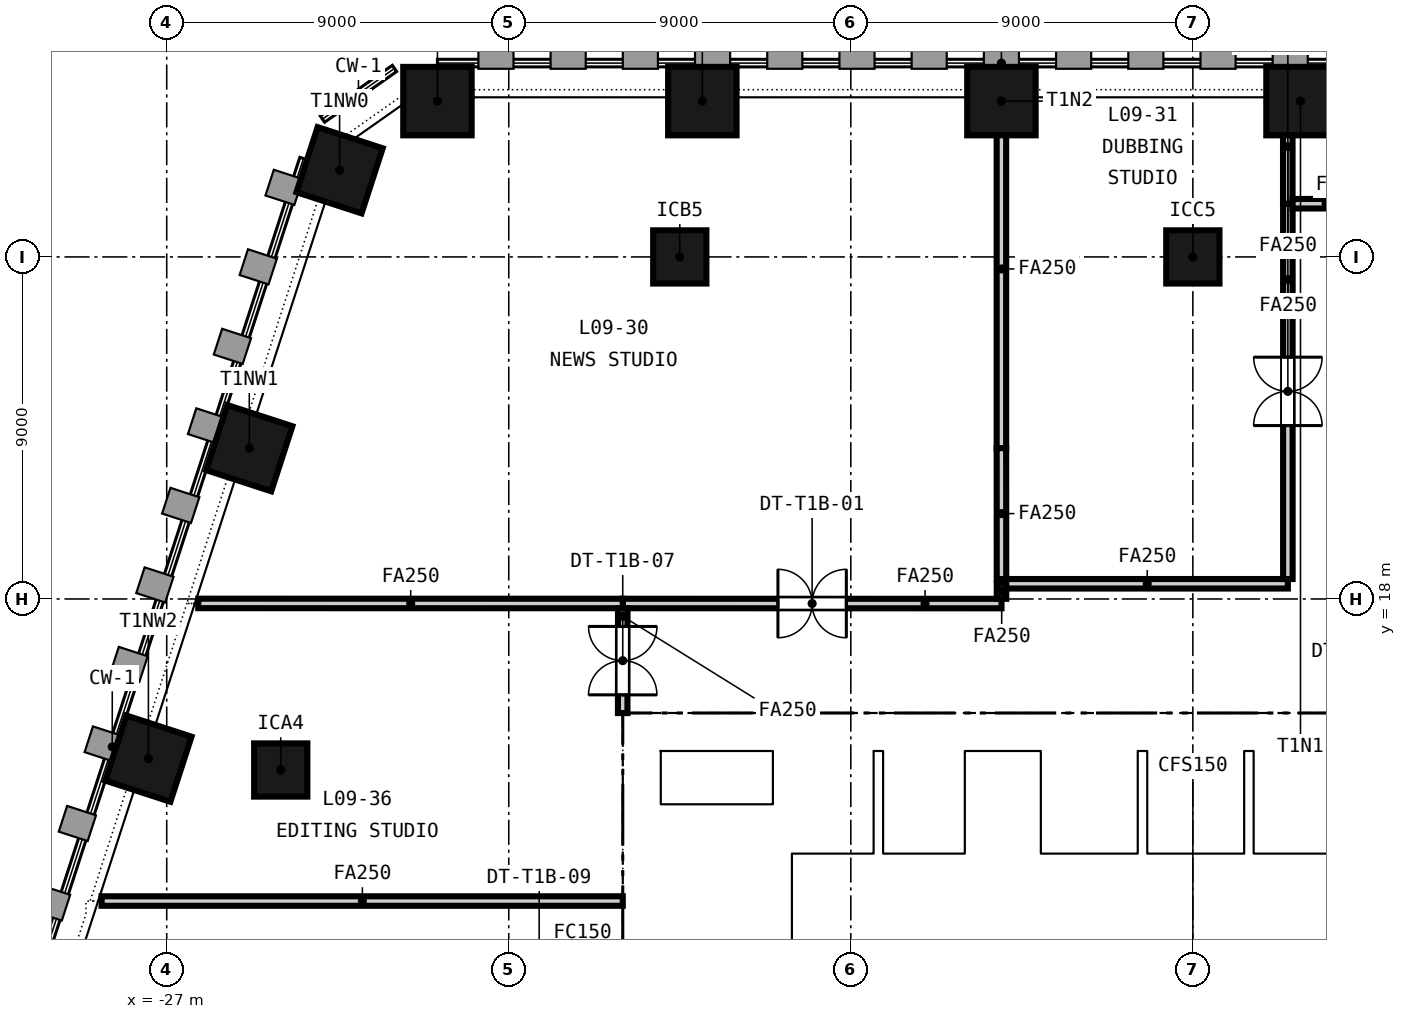
"""IFC4 building model, lengths in metres.
Left out: names, types, materials, properties, quantities, classifications, styles, units other than length and angle.
Written with IfcOpenShell. Run it as: python <this file> out.ifc"""

import sys

from ifc_helpers import new_model, si_unit, direction, frame, frame_2d, origin, origin_2d, place, context, subcontext, project, spatial, rectangle, extrude, element, fill, save


model = new_model("IFC4")
c1 = context("Model", 3, precision=1e-05, world=origin(), true_north=direction((0.0, 1.0)))
c2 = subcontext(c1, "Body", "Model", "MODEL_VIEW")
j1 = project(units=[si_unit("LENGTHUNIT", "METRE"), si_unit("PLANEANGLEUNIT", "RADIAN")], contexts=[c1])
p1 = place(None, origin())
s1 = spatial("IfcSite", under=j1, at=p1, CompositionType="ELEMENT")
p2 = place(p1, origin())
s2 = spatial("IfcBuilding", under=s1, at=p2, CompositionType="ELEMENT")
p3 = place(p2, frame((0.0, 0.0, 46.95)))
s3 = spatial("IfcBuildingStorey", under=s2, at=p3, CompositionType="ELEMENT", Elevation=46.95)
p4 = place(p3, frame((-15.0, 14.5, -0.15), z_axis=(0.0, 0.0, 1.0), x_axis=(1.0, 0.0, 0.0)))
e1 = element("IfcWall", 1, at=p4, inside=s3, PredefinedType="SOLIDWALL", context=c2, shape_type="SweptSolid", body=[
    extrude(rectangle(XDim=30.0, YDim=1.0, at=frame_2d((15.0, 0.0))), origin(), (0.0, 0.0, 1.0), 3.65),
])
p5 = place(p4, frame((9.25, 0.0, 0.15)))
e2 = element("IfcOpeningElement", 2, at=p5, cuts=e1, PredefinedType="OPENING", context=c2, shape_type="SweptSolid", body=[
    extrude(rectangle(XDim=1.5, YDim=2.1, at=frame_2d((0.75, 1.05))), frame((0.0, 0.51, 0.0), z_axis=(0.0, -1.0, 0.0), x_axis=(1.0, 0.0, 0.0)), (0.0, 0.0, 1.0), 1.02),
])
p6 = place(p4, frame((19.4, 0.0, 0.15)))
e3 = element("IfcOpeningElement", 3, at=p6, cuts=e1, PredefinedType="OPENING", context=c2, shape_type="SweptSolid", body=[
    extrude(rectangle(XDim=1.5, YDim=2.1, at=frame_2d((0.75, 1.05))), frame((0.0, 0.51, 0.0), z_axis=(0.0, -1.0, 0.0), x_axis=(1.0, 0.0, 0.0)), (0.0, 0.0, 1.0), 1.02),
])
p7 = place(p4, frame((1.5, 0.0, 0.15)))
e4 = element("IfcOpeningElement", 4, at=p7, cuts=e1, PredefinedType="OPENING", context=c2, shape_type="SweptSolid", body=[
    extrude(rectangle(XDim=1.2, YDim=2.1, at=frame_2d((0.6, 1.05))), frame((0.0, 0.51, 0.0), z_axis=(0.0, -1.0, 0.0), x_axis=(1.0, 0.0, 0.0)), (0.0, 0.0, 1.0), 1.02),
])
p8 = place(p4, frame((27.3, 0.0, 0.15)))
e5 = element("IfcOpeningElement", 5, at=p8, cuts=e1, PredefinedType="OPENING", context=c2, shape_type="SweptSolid", body=[
    extrude(rectangle(XDim=1.2, YDim=2.1, at=frame_2d((0.6, 1.05))), frame((0.0, 0.51, 0.0), z_axis=(0.0, -1.0, 0.0), x_axis=(1.0, 0.0, 0.0)), (0.0, 0.0, 1.0), 1.02),
])
p9 = place(p3, frame((-14.5, 1.0, -0.15), z_axis=(0.0, 0.0, 1.0), x_axis=(0.0, 1.0, 0.0)))
e6 = element("IfcWall", 6, at=p9, inside=s3, PredefinedType="SOLIDWALL", context=c2, shape_type="SweptSolid", body=[
    extrude(rectangle(XDim=13.0, YDim=1.0, at=frame_2d((6.5, 0.0))), origin(), (0.0, 0.0, 1.0), 3.65),
])
p10 = place(p3, frame((-10.8, 1.0, -0.15), z_axis=(0.0, 0.0, 1.0), x_axis=(0.0, 1.0, 0.0)))
e7 = element("IfcWall", 7, at=p10, inside=s3, PredefinedType="SOLIDWALL", context=c2, shape_type="SweptSolid", body=[
    extrude(rectangle(XDim=13.0, YDim=0.5, at=frame_2d((6.5, 0.0))), origin(), (0.0, 0.0, 1.0), 3.65),
])
for number, where, z_axis, x_axis in (
    (8, (2.832, 31.1, -0.15), (0.0, 0.0, 1.0), (-1.0, 0.0, 0.0)),
    (9, (-5.037, 31.1, -0.15), (0.0, 0.0, 1.0), (-1.0, 0.0, 0.0)),
    (10, (-12.907, 31.1, -0.15), (0.0, 0.0, 1.0), (-1.0, 0.0, 0.0)),
    (11, (-19.876, 31.1, -0.15), (0.0, 0.0, 1.0), (-1.0, 0.0, 0.0)),
    (12, (-22.451, 29.281, -0.15), (0.0, 0.0, 1.0), (-0.309, -0.951, 0.0)),
    (13, (-24.827, 21.968, -0.15), (0.0, 0.0, 1.0), (-0.309, -0.951, 0.0)),
    (14, (-27.482, 13.799, -0.15), (0.0, 0.0, 1.0), (-0.309, -0.951, 0.0)),
):
    element("IfcColumn", number, at=place(p3, frame(where, z_axis=z_axis, x_axis=x_axis)), inside=s3, PredefinedType="COLUMN", context=c2, shape_type="SweptSolid", body=[
        extrude(rectangle(XDim=1.8, YDim=1.8, at=origin_2d()), origin(), (0.0, 0.0, 1.0), 3.65),
    ])
for number, where, z_axis, x_axis in (
    (15, (-24.0, 13.5, -0.15), (0.0, 0.0, 1.0), (1.0, 0.0, 0.0)),
    (16, (-13.5, 27.0, -0.15), (0.0, 0.0, 1.0), (1.0, 0.0, 0.0)),
    (17, (0.0, 27.0, -0.15), (0.0, 0.0, 1.0), (1.0, 0.0, 0.0)),
):
    element("IfcColumn", number, at=place(p3, frame(where, z_axis=z_axis, x_axis=x_axis)), inside=s3, PredefinedType="COLUMN", context=c2, shape_type="SweptSolid", body=[
        extrude(rectangle(XDim=1.4, YDim=1.4, at=origin_2d()), origin(), (0.0, 0.0, 1.0), 3.65),
    ])
p11 = place(p3, frame((-10.55, 11.2, 0.0), z_axis=(0.0, 0.0, 1.0), x_axis=(1.0, 0.0, 0.0)))
e18 = element("IfcWall", 18, at=p11, inside=s3, PredefinedType="PARTITIONING", context=c2, shape_type="SweptSolid", body=[
    extrude(rectangle(XDim=4.8, YDim=0.2, at=frame_2d((2.4, 0.0))), origin(), (0.0, 0.0, 1.0), 3.5),
])
p12 = place(p11, frame((0.525, 0.0, 0.0)))
e19 = element("IfcOpeningElement", 19, at=p12, cuts=e18, PredefinedType="OPENING", context=c2, shape_type="SweptSolid", body=[
    extrude(rectangle(XDim=1.1, YDim=2.1, at=frame_2d((0.55, 1.05))), frame((0.0, 0.11, 0.0), z_axis=(0.0, -1.0, 0.0), x_axis=(1.0, 0.0, 0.0)), (0.0, 0.0, 1.0), 0.22),
])
p13 = place(p11, frame((2.925, 0.0, 0.0)))
e20 = element("IfcOpeningElement", 20, at=p13, cuts=e18, PredefinedType="OPENING", context=c2, shape_type="SweptSolid", body=[
    extrude(rectangle(XDim=1.1, YDim=2.1, at=frame_2d((0.55, 1.05))), frame((0.0, 0.11, 0.0), z_axis=(0.0, -1.0, 0.0), x_axis=(1.0, 0.0, 0.0)), (0.0, 0.0, 1.0), 0.22),
])
p14 = place(p3, frame((-4.25, 11.2, 0.0), z_axis=(0.0, 0.0, 1.0), x_axis=(1.0, 0.0, 0.0)))
e21 = element("IfcWall", 21, at=p14, inside=s3, PredefinedType="PARTITIONING", context=c2, shape_type="SweptSolid", body=[
    extrude(rectangle(XDim=8.65, YDim=0.2, at=frame_2d((4.325, 0.0))), origin(), (0.0, 0.0, 1.0), 3.5),
])
p15 = place(p14, frame((0.825, 0.0, 0.0)))
e22 = element("IfcOpeningElement", 22, at=p15, cuts=e21, PredefinedType="OPENING", context=c2, shape_type="SweptSolid", body=[
    extrude(rectangle(XDim=1.4, YDim=2.1, at=frame_2d((0.7, 1.05))), frame((0.0, 0.11, 0.0), z_axis=(0.0, -1.0, 0.0), x_axis=(1.0, 0.0, 0.0)), (0.0, 0.0, 1.0), 0.22),
])
p16 = place(p14, frame((3.625, 0.0, 0.0)))
e23 = element("IfcOpeningElement", 23, at=p16, cuts=e21, PredefinedType="OPENING", context=c2, shape_type="SweptSolid", body=[
    extrude(rectangle(XDim=1.4, YDim=2.1, at=frame_2d((0.7, 1.05))), frame((0.0, 0.11, 0.0), z_axis=(0.0, -1.0, 0.0), x_axis=(1.0, 0.0, 0.0)), (0.0, 0.0, 1.0), 0.22),
])
p17 = place(p3, frame((-4.125, 6.15, 0.0), z_axis=(0.0, 0.0, 1.0), x_axis=(0.0, 1.0, 0.0)))
e24 = element("IfcWall", 24, at=p17, inside=s3, PredefinedType="PARTITIONING", context=c2, shape_type="SweptSolid", body=[
    extrude(rectangle(XDim=4.95, YDim=0.25, at=frame_2d((2.475, 0.0))), origin(), (0.0, 0.0, 1.0), 3.5),
])
p18 = place(p17, frame((3.125, 0.0, 0.0)))
e25 = element("IfcOpeningElement", 25, at=p18, cuts=e24, PredefinedType="OPENING", context=c2, shape_type="SweptSolid", body=[
    extrude(rectangle(XDim=1.2, YDim=2.1, at=frame_2d((0.6, 1.05))), frame((0.0, 0.135, 0.0), z_axis=(0.0, -1.0, 0.0), x_axis=(1.0, 0.0, 0.0)), (0.0, 0.0, 1.0), 0.27),
])
for number, where, z_axis, x_axis in (
    (26, (-8.275, 11.3, 0.0), (0.0, 0.0, 1.0), (0.0, 1.0, 0.0)),
    (27, (-5.875, 11.3, 0.0), (0.0, 0.0, 1.0), (0.0, 1.0, 0.0)),
    (28, (-4.125, 11.3, 0.0), (0.0, 0.0, 1.0), (0.0, 1.0, 0.0)),
    (29, (-1.325, 11.3, 0.0), (0.0, 0.0, 1.0), (0.0, 1.0, 0.0)),
    (30, (1.475, 11.3, 0.0), (0.0, 0.0, 1.0), (0.0, 1.0, 0.0)),
):
    element("IfcWall", number, at=place(p3, frame(where, z_axis=z_axis, x_axis=x_axis)), inside=s3, PredefinedType="PARTITIONING", context=c2, shape_type="SweptSolid", body=[
        extrude(rectangle(XDim=2.7, YDim=0.25, at=frame_2d((1.35, 0.0))), origin(), (0.0, 0.0, 1.0), 3.5),
    ])
p19 = place(p3, frame((-15.0, 17.881, 0.0), z_axis=(0.0, 0.0, 1.0), x_axis=(0.999999975691, -0.000220496356, 0.0)))
e31 = element("IfcWall", 31, at=p19, inside=s3, PredefinedType="PARTITIONING", context=c2, shape_type="SweptSolid", body=[
    extrude(rectangle(XDim=9.965, YDim=0.25, at=frame_2d((4.982, 0.0))), origin(), (0.0, 0.0, 1.0), 2.741),
])
p20 = place(p19, frame((4.083, 0.0, 0.0)))
e32 = element("IfcOpeningElement", 32, at=p20, cuts=e31, PredefinedType="OPENING", context=c2, shape_type="SweptSolid", body=[
    extrude(rectangle(XDim=1.8, YDim=2.1, at=frame_2d((0.9, 1.05))), frame((0.0, 0.135, 0.0), z_axis=(0.0, -1.0, 0.0), x_axis=(1.0, 0.0, 0.0)), (0.0, 0.0, 1.0), 0.27),
])
p21 = place(p3, frame((-5.035, 18.004, 0.0), z_axis=(0.0, 0.0, 1.0), x_axis=(0.0, 1.0, 0.0)))
e33 = element("IfcWall", 33, at=p21, inside=s3, PredefinedType="PARTITIONING", context=c2, shape_type="SweptSolid", body=[
    extrude(rectangle(XDim=0.396, YDim=0.25, at=frame_2d((0.198, 0.0))), origin(), (0.0, 0.0, 1.0), 2.741),
])
p22 = place(p3, frame((-5.037, 21.968, 0.0), z_axis=(0.0, 0.0, 1.0), x_axis=(0.0, 1.0, 0.0)))
e34 = element("IfcWall", 34, at=p22, inside=s3, PredefinedType="PARTITIONING", context=c2, shape_type="SweptSolid", body=[
    extrude(rectangle(XDim=9.432, YDim=0.25, at=frame_2d((4.716, 0.0))), origin(), (0.0, 0.0, 1.0), 2.741),
])
p23 = place(p3, frame((-26.17, 17.883, 0.0), z_axis=(0.0, 0.0, 1.0), x_axis=(0.999999988296, -0.000152998774, 0.0)))
e35 = element("IfcWall", 35, at=p23, inside=s3, PredefinedType="PARTITIONING", context=c2, shape_type="SweptSolid", body=[
    extrude(rectangle(XDim=11.17, YDim=0.25, at=frame_2d((5.585, 0.0))), origin(), (0.0, 0.0, 1.0), 2.741),
])
p24 = place(p3, frame((-4.91, 18.4, 0.0), z_axis=(0.0, 0.0, 1.0), x_axis=(1.0, 0.0, 0.0)))
e36 = element("IfcWall", 36, at=p24, inside=s3, PredefinedType="PARTITIONING", context=c2, shape_type="SweptSolid", body=[
    extrude(rectangle(XDim=7.41, YDim=0.25, at=frame_2d((3.705, 0.0))), origin(), (0.0, 0.0, 1.0), 2.741),
])
p25 = place(p3, frame((2.5, 18.525, 0.0), z_axis=(0.0, 0.0, 1.0), x_axis=(0.0, 1.0, 0.0)))
e37 = element("IfcWall", 37, at=p25, inside=s3, PredefinedType="PARTITIONING", context=c2, shape_type="SweptSolid", body=[
    extrude(rectangle(XDim=9.875, YDim=0.25, at=frame_2d((4.938, 0.0))), origin(), (0.0, 0.0, 1.0), 2.741),
])
p26 = place(p25, frame((4.038, 0.0, 0.0)))
e38 = element("IfcOpeningElement", 38, at=p26, cuts=e37, PredefinedType="OPENING", context=c2, shape_type="SweptSolid", body=[
    extrude(rectangle(XDim=1.8, YDim=2.1, at=frame_2d((0.9, 1.05))), frame((0.0, 0.135, 0.0), z_axis=(0.0, -1.0, 0.0), x_axis=(1.0, 0.0, 0.0)), (0.0, 0.0, 1.0), 0.27),
])
p27 = place(p3, frame((-5.037, 21.968, 0.0), z_axis=(0.0, 0.0, 1.0), x_axis=(0.000567255103, -0.999999839111, 0.0)))
e39 = element("IfcWall", 39, at=p27, inside=s3, PredefinedType="PARTITIONING", context=c2, shape_type="SweptSolid", body=[
    extrude(rectangle(XDim=3.443, YDim=0.25, at=frame_2d((1.722, 0.0))), origin(), (0.0, 0.0, 1.0), 2.741),
])
p28 = place(p3, frame((2.498, 28.4, 0.0), z_axis=(0.0, 0.0, 1.0), x_axis=(0.0, 1.0, 0.0)))
e40 = element("IfcWall", 40, at=p28, inside=s3, PredefinedType="PARTITIONING", context=c2, shape_type="SweptSolid", body=[
    extrude(rectangle(XDim=3.0, YDim=0.25, at=frame_2d((1.5, 0.0))), origin(), (0.0, 0.0, 1.0), 2.741),
])
p29 = place(p3, frame((2.625, 28.4, 0.0), z_axis=(0.0, 0.0, 1.0), x_axis=(1.0, 0.0, 0.0)))
e41 = element("IfcWall", 41, at=p29, inside=s3, PredefinedType="PARTITIONING", context=c2, shape_type="SweptSolid", body=[
    extrude(rectangle(XDim=1.75, YDim=0.25, at=frame_2d((0.875, 0.0))), origin(), (0.0, 0.0, 1.0), 2.741),
])
p30 = place(p3, frame((-15.002, 14.998, 0.0), z_axis=(0.0, 0.0, 1.0), x_axis=(0.000708152429, 0.99999974926, 0.0)))
e42 = element("IfcWall", 42, at=p30, inside=s3, PredefinedType="PARTITIONING", context=c2, shape_type="SweptSolid", body=[
    extrude(rectangle(XDim=2.758, YDim=0.25, at=frame_2d((1.379, 0.0))), origin(), (0.0, 0.0, 1.0), 2.741),
])
p31 = place(p30, frame((0.479, 0.0, 0.0)))
e43 = element("IfcOpeningElement", 43, at=p31, cuts=e42, PredefinedType="OPENING", context=c2, shape_type="SweptSolid", body=[
    extrude(rectangle(XDim=1.8, YDim=2.1, at=frame_2d((0.9, 1.05))), frame((0.0, 0.135, 0.0), z_axis=(0.0, -1.0, 0.0), x_axis=(1.0, 0.0, 0.0)), (0.0, 0.0, 1.0), 0.27),
])
p32 = place(p3, frame((-28.714, 10.052, 0.0), z_axis=(0.0, 0.0, 1.0), x_axis=(1.0, 0.0, 0.0)))
e44 = element("IfcWall", 44, at=p32, inside=s3, PredefinedType="PARTITIONING", context=c2, shape_type="SweptSolid", body=[
    extrude(rectangle(XDim=13.714, YDim=0.25, at=frame_2d((6.857, 0.0))), origin(), (0.0, 0.0, 1.0), 2.741),
])
p33 = place(p18, origin())
e45 = element("IfcDoor", 45, at=p33, inside=s3, OperationType="SINGLE_SWING_LEFT", PredefinedType="DOOR", context=c2, shape_type="SweptSolid", body=[
    extrude(rectangle(XDim=1.2, YDim=2.1, at=frame_2d((0.6, 1.05))), frame((0.0, 0.025, 0.0), z_axis=(0.0, -1.0, 0.0), x_axis=(1.0, 0.0, 0.0)), (0.0, 0.0, 1.0), 0.05),
])
fill(e25, e45)
p34 = place(p12, origin())
e46 = element("IfcDoor", 46, at=p34, inside=s3, OperationType="DOUBLE_DOOR_SLIDING", PredefinedType="DOOR", context=c2, shape_type="SweptSolid", body=[
    extrude(rectangle(XDim=1.1, YDim=2.1, at=frame_2d((0.55, 1.05))), frame((0.0, 0.025, 0.0), z_axis=(0.0, -1.0, 0.0), x_axis=(1.0, 0.0, 0.0)), (0.0, 0.0, 1.0), 0.05),
])
fill(e19, e46)
p35 = place(p13, origin())
e47 = element("IfcDoor", 47, at=p35, inside=s3, OperationType="DOUBLE_DOOR_SLIDING", PredefinedType="DOOR", context=c2, shape_type="SweptSolid", body=[
    extrude(rectangle(XDim=1.1, YDim=2.1, at=frame_2d((0.55, 1.05))), frame((0.0, 0.025, 0.0), z_axis=(0.0, -1.0, 0.0), x_axis=(1.0, 0.0, 0.0)), (0.0, 0.0, 1.0), 0.05),
])
fill(e20, e47)
p36 = place(p15, origin())
e48 = element("IfcDoor", 48, at=p36, inside=s3, OperationType="DOUBLE_DOOR_SLIDING", PredefinedType="DOOR", context=c2, shape_type="SweptSolid", body=[
    extrude(rectangle(XDim=1.4, YDim=2.1, at=frame_2d((0.7, 1.05))), frame((0.0, 0.025, 0.0), z_axis=(0.0, -1.0, 0.0), x_axis=(1.0, 0.0, 0.0)), (0.0, 0.0, 1.0), 0.05),
])
fill(e22, e48)
p37 = place(p16, origin())
e49 = element("IfcDoor", 49, at=p37, inside=s3, OperationType="DOUBLE_DOOR_SLIDING", PredefinedType="DOOR", context=c2, shape_type="SweptSolid", body=[
    extrude(rectangle(XDim=1.4, YDim=2.1, at=frame_2d((0.7, 1.05))), frame((0.0, 0.025, 0.0), z_axis=(0.0, -1.0, 0.0), x_axis=(1.0, 0.0, 0.0)), (0.0, 0.0, 1.0), 0.05),
])
fill(e23, e49)
p38 = place(p5, origin())
e50 = element("IfcDoor", 50, at=p38, inside=s3, OperationType="DOUBLE_DOOR_SINGLE_SWING", PredefinedType="DOOR", context=c2, shape_type="SweptSolid", body=[
    extrude(rectangle(XDim=1.5, YDim=2.1, at=frame_2d((0.75, 1.05))), frame((0.0, 0.025, 0.0), z_axis=(0.0, -1.0, 0.0), x_axis=(1.0, 0.0, 0.0)), (0.0, 0.0, 1.0), 0.05),
])
fill(e2, e50)
p39 = place(p7, origin())
e51 = element("IfcDoor", 51, at=p39, inside=s3, OperationType="SINGLE_SWING_RIGHT", PredefinedType="DOOR", context=c2, shape_type="SweptSolid", body=[
    extrude(rectangle(XDim=1.2, YDim=2.1, at=frame_2d((0.6, 1.05))), frame((0.0, 0.025, 0.0), z_axis=(0.0, -1.0, 0.0), x_axis=(1.0, 0.0, 0.0)), (0.0, 0.0, 1.0), 0.05),
])
fill(e4, e51)
p40 = place(p20, origin())
e52 = element("IfcDoor", 52, at=p40, inside=s3, OperationType="DOUBLE_DOOR_DOUBLE_SWING", PredefinedType="DOOR", context=c2, shape_type="SweptSolid", body=[
    extrude(rectangle(XDim=1.8, YDim=2.1, at=frame_2d((0.9, 1.05))), frame((0.0, 0.025, 0.0), z_axis=(0.0, -1.0, 0.0), x_axis=(1.0, 0.0, 0.0)), (0.0, 0.0, 1.0), 0.05),
])
fill(e32, e52)
p41 = place(p26, origin())
e53 = element("IfcDoor", 53, at=p41, inside=s3, OperationType="DOUBLE_DOOR_DOUBLE_SWING", PredefinedType="DOOR", context=c2, shape_type="SweptSolid", body=[
    extrude(rectangle(XDim=1.8, YDim=2.1, at=frame_2d((0.9, 1.05))), frame((0.0, 0.025, 0.0), z_axis=(0.0, -1.0, 0.0), x_axis=(1.0, 0.0, 0.0)), (0.0, 0.0, 1.0), 0.05),
])
fill(e38, e53)
p42 = place(p31, origin())
e54 = element("IfcDoor", 54, at=p42, inside=s3, OperationType="DOUBLE_DOOR_DOUBLE_SWING", PredefinedType="DOOR", context=c2, shape_type="SweptSolid", body=[
    extrude(rectangle(XDim=1.8, YDim=2.1, at=frame_2d((0.9, 1.05))), frame((0.0, 0.025, 0.0), z_axis=(0.0, -1.0, 0.0), x_axis=(1.0, 0.0, 0.0)), (0.0, 0.0, 1.0), 0.05),
])
fill(e43, e54)
save(model, sys.argv[1])
